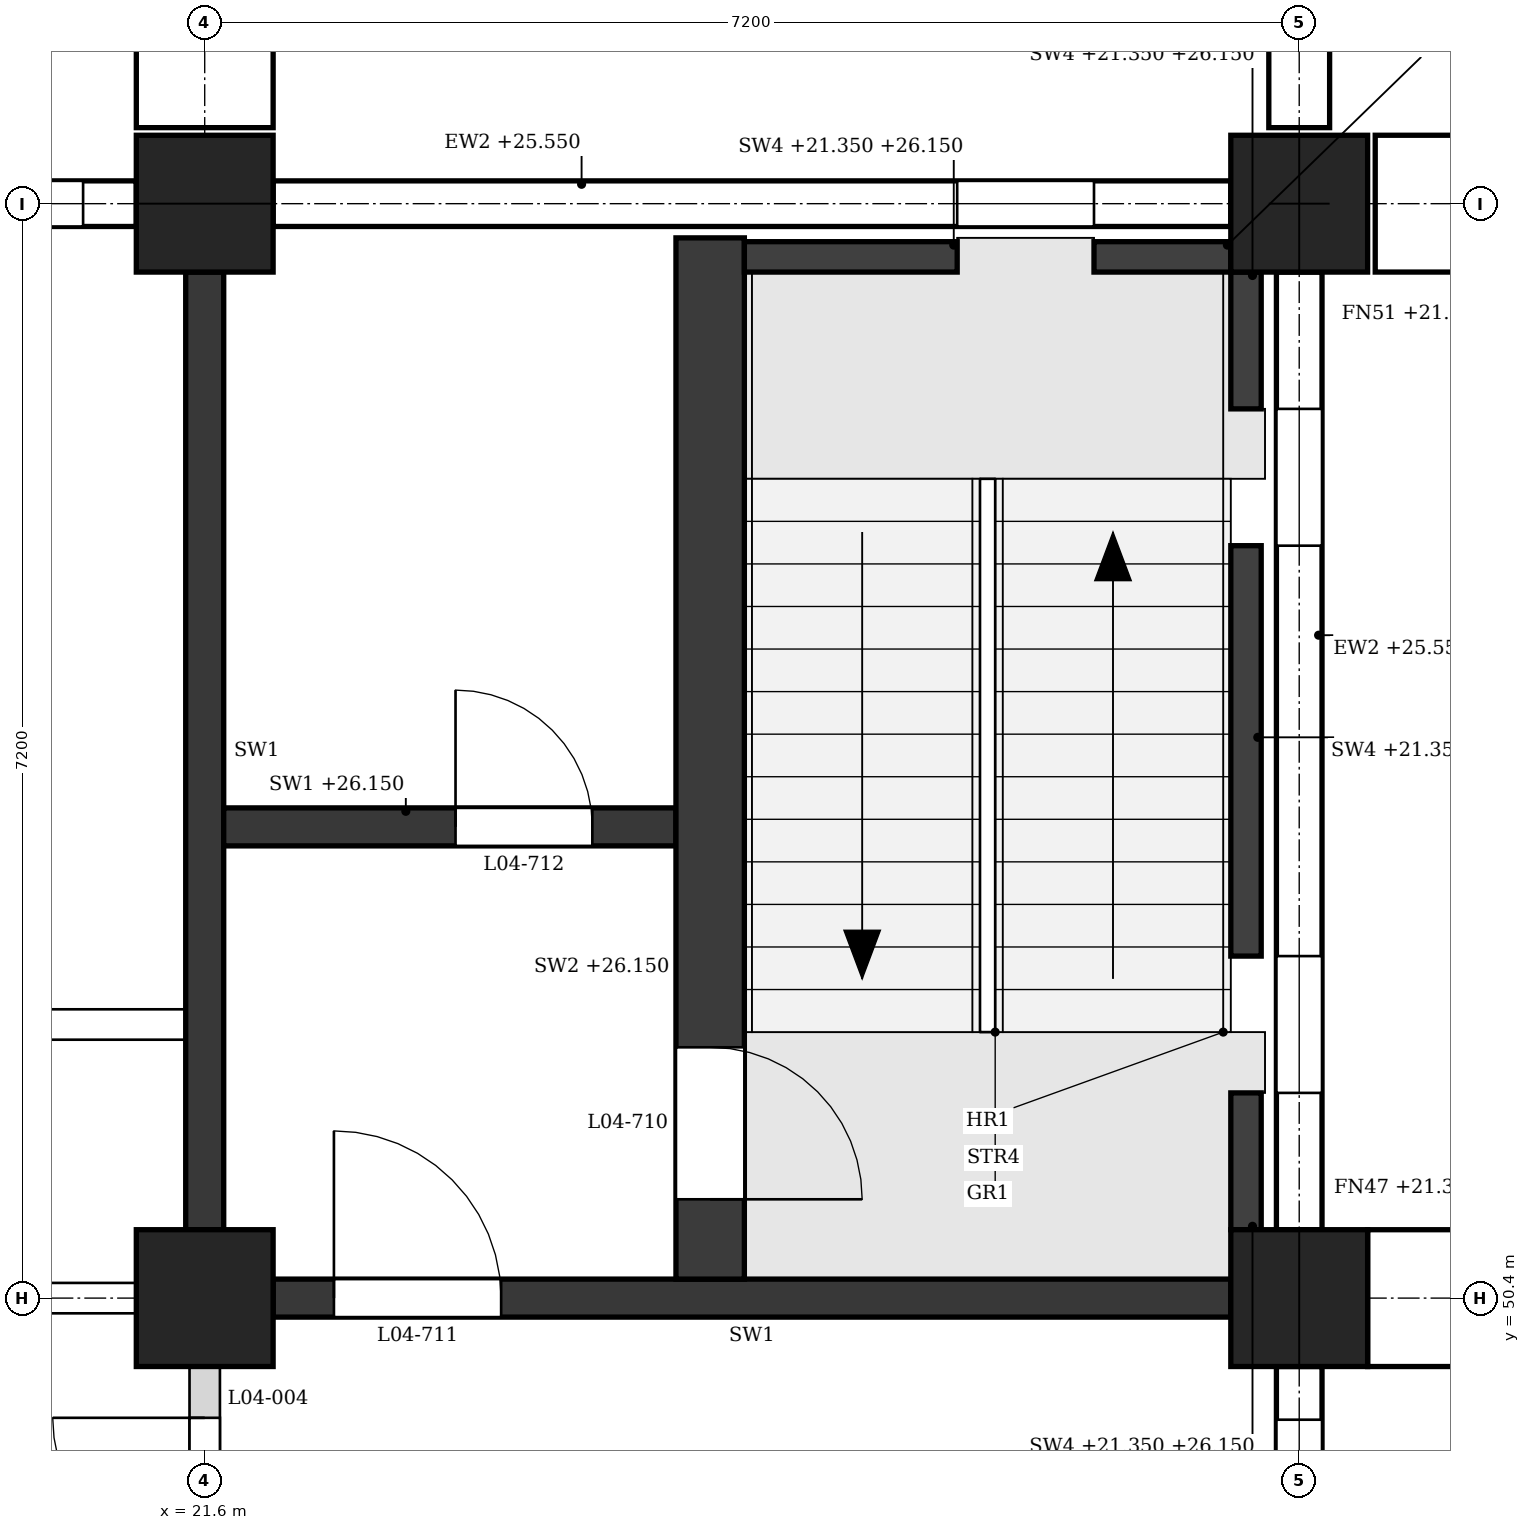
"""IFC4 building model, lengths in metres.
Left out: names, types, materials, properties, quantities, classifications, styles, units other than length and angle.
Written with IfcOpenShell. Run it as: python <this file> out.ifc"""

import sys

from ifc_helpers import new_model, si_unit, direction, frame, frame_2d, origin, origin_2d, place, context, subcontext, project, spatial, polyline, rectangle, outline, extrude, element, fill, save


model = new_model("IFC4")
c1 = context("Model", 3, precision=1e-05, world=origin(), true_north=direction((0.0, 1.0)))
c2 = subcontext(c1, "Body", "Model", "MODEL_VIEW")
j1 = project(units=[si_unit("LENGTHUNIT", "METRE"), si_unit("PLANEANGLEUNIT", "RADIAN")], contexts=[c1])
p1 = place(None, origin())
s1 = spatial("IfcSite", under=j1, at=p1, CompositionType="ELEMENT")
p2 = place(p1, origin())
s2 = spatial("IfcBuilding", under=s1, at=p2, CompositionType="ELEMENT")
p3 = place(p2, frame((0.0, 0.0, 21.6)))
s3 = spatial("IfcBuildingStorey", under=s2, at=p3, CompositionType="ELEMENT", Elevation=21.6)
for number, where, z_axis, x_axis in (
    (1, (21.6, 50.4, 0.0), (0.0, 0.0, 1.0), (1.0, 0.0, 0.0)),
    (2, (21.6, 57.6, 0.0), (0.0, 0.0, 1.0), (1.0, 0.0, 0.0)),
    (3, (28.8, 50.4, 0.0), (0.0, 0.0, 1.0), (1.0, 0.0, 0.0)),
    (4, (28.8, 57.6, 0.0), (0.0, 0.0, 1.0), (1.0, 0.0, 0.0)),
):
    element("IfcColumn", number, at=place(p3, frame(where, z_axis=z_axis, x_axis=x_axis)), inside=s3, PredefinedType="COLUMN", context=c2, shape_type="SweptSolid", body=[
        extrude(rectangle(XDim=0.9, YDim=0.9, at=origin_2d()), origin(), (0.0, 0.0, 1.0), 4.8),
    ])
p4 = place(p3, frame((28.35, 57.6, 0.0), z_axis=(0.0, 0.0, 1.0), x_axis=(-1.0, 0.0, 0.0)))
e5 = element("IfcWall", 5, at=p4, inside=s3, PredefinedType="STANDARD", context=c2, shape_type="SweptSolid", body=[
    extrude(rectangle(XDim=6.3, YDim=0.3, at=frame_2d((3.15, 0.0))), origin(), (0.0, 0.0, 1.0), 3.95),
])
p5 = place(p4, frame((0.9, 0.0, 0.9)))
e6 = element("IfcOpeningElement", 6, at=p5, cuts=e5, PredefinedType="OPENING", context=c2, shape_type="SweptSolid", body=[
    extrude(outline(polyline([(0.0, 0.0), (0.9, 0.0), (0.9, 2.05), (0.45, 2.5), (0.0, 2.05), (0.0, 0.0)])), frame((0.0, 0.16, 0.0), z_axis=(0.0, -1.0, 0.0), x_axis=(1.0, 0.0, 0.0)), (0.0, 0.0, 1.0), 0.32),
])
p6 = place(p3, frame((21.15, 57.6, 0.0), z_axis=(0.0, 0.0, 1.0), x_axis=(-1.0, 0.0, 0.0)))
e7 = element("IfcWall", 7, at=p6, inside=s3, PredefinedType="STANDARD", context=c2, shape_type="SweptSolid", body=[
    extrude(rectangle(XDim=6.3, YDim=0.3, at=frame_2d((3.15, 0.0))), origin(), (0.0, 0.0, 1.0), 3.95),
])
p7 = place(p6, frame((0.35, 0.0, 0.9)))
e8 = element("IfcOpeningElement", 8, at=p7, cuts=e7, PredefinedType="OPENING", context=c2, shape_type="SweptSolid", body=[
    extrude(outline(polyline([(0.0, 0.0), (0.85, 0.0), (0.85, 2.05), (0.425, 2.5), (0.0, 2.05), (0.0, 0.0)])), frame((0.0, 0.16, 0.0), z_axis=(0.0, -1.0, 0.0), x_axis=(1.0, 0.0, 0.0)), (0.0, 0.0, 1.0), 0.32),
])
p8 = place(p6, frame((1.5, 0.0, 0.9)))
e9 = element("IfcOpeningElement", 9, at=p8, cuts=e7, PredefinedType="OPENING", context=c2, shape_type="SweptSolid", body=[
    extrude(outline(polyline([(0.0, 0.0), (0.85, 0.0), (0.85, 2.05), (0.425, 2.5), (0.0, 2.05), (0.0, 0.0)])), frame((0.0, 0.16, 0.0), z_axis=(0.0, -1.0, 0.0), x_axis=(1.0, 0.0, 0.0)), (0.0, 0.0, 1.0), 0.32),
])
p9 = place(p6, frame((3.95, 0.0, 0.9)))
e10 = element("IfcOpeningElement", 10, at=p9, cuts=e7, PredefinedType="OPENING", context=c2, shape_type="SweptSolid", body=[
    extrude(outline(polyline([(0.0, 0.0), (0.85, 0.0), (0.85, 2.05), (0.425, 2.5), (0.0, 2.05), (0.0, 0.0)])), frame((0.0, 0.16, 0.0), z_axis=(0.0, -1.0, 0.0), x_axis=(1.0, 0.0, 0.0)), (0.0, 0.0, 1.0), 0.32),
])
p10 = place(p6, frame((5.1, 0.0, 0.9)))
e11 = element("IfcOpeningElement", 11, at=p10, cuts=e7, PredefinedType="OPENING", context=c2, shape_type="SweptSolid", body=[
    extrude(outline(polyline([(0.0, 0.0), (0.85, 0.0), (0.85, 2.05), (0.425, 2.5), (0.0, 2.05), (0.0, 0.0)])), frame((0.0, 0.16, 0.0), z_axis=(0.0, -1.0, 0.0), x_axis=(1.0, 0.0, 0.0)), (0.0, 0.0, 1.0), 0.32),
])
p11 = place(p3, frame((28.8, 43.65, 0.0), z_axis=(0.0, 0.0, 1.0), x_axis=(0.0, 1.0, 0.0)))
e12 = element("IfcWall", 12, at=p11, inside=s3, PredefinedType="STANDARD", context=c2, shape_type="SweptSolid", body=[
    extrude(rectangle(XDim=6.3, YDim=0.3, at=frame_2d((3.15, 0.0))), origin(), (0.0, 0.0, 1.0), 3.95),
])
p12 = place(p11, frame((3.95, 0.0, 0.9)))
e13 = element("IfcOpeningElement", 13, at=p12, cuts=e12, PredefinedType="OPENING", context=c2, shape_type="SweptSolid", body=[
    extrude(outline(polyline([(0.0, 0.0), (0.85, 0.0), (0.85, 2.05), (0.425, 2.5), (0.0, 2.05), (0.0, 0.0)])), frame((0.0, 0.16, 0.0), z_axis=(0.0, -1.0, 0.0), x_axis=(1.0, 0.0, 0.0)), (0.0, 0.0, 1.0), 0.32),
])
p13 = place(p11, frame((5.1, 0.0, 0.9)))
e14 = element("IfcOpeningElement", 14, at=p13, cuts=e12, PredefinedType="OPENING", context=c2, shape_type="SweptSolid", body=[
    extrude(outline(polyline([(0.0, 0.0), (0.85, 0.0), (0.85, 2.05), (0.425, 2.5), (0.0, 2.05), (0.0, 0.0)])), frame((0.0, 0.16, 0.0), z_axis=(0.0, -1.0, 0.0), x_axis=(1.0, 0.0, 0.0)), (0.0, 0.0, 1.0), 0.32),
])
p14 = place(p3, frame((28.8, 50.85, 0.0), z_axis=(0.0, 0.0, 1.0), x_axis=(0.0, 1.0, 0.0)))
e15 = element("IfcWall", 15, at=p14, inside=s3, PredefinedType="STANDARD", context=c2, shape_type="SweptSolid", body=[
    extrude(rectangle(XDim=6.3, YDim=0.3, at=frame_2d((3.15, 0.0))), origin(), (0.0, 0.0, 1.0), 3.95),
])
p15 = place(p14, frame((0.9, 0.0, 0.9)))
e16 = element("IfcOpeningElement", 16, at=p15, cuts=e15, PredefinedType="OPENING", context=c2, shape_type="SweptSolid", body=[
    extrude(outline(polyline([(0.0, 0.0), (0.9, 0.0), (0.9, 2.05), (0.45, 2.5), (0.0, 2.05), (0.0, 0.0)])), frame((0.0, 0.16, 0.0), z_axis=(0.0, -1.0, 0.0), x_axis=(1.0, 0.0, 0.0)), (0.0, 0.0, 1.0), 0.32),
])
p16 = place(p14, frame((4.5, 0.0, 0.9)))
e17 = element("IfcOpeningElement", 17, at=p16, cuts=e15, PredefinedType="OPENING", context=c2, shape_type="SweptSolid", body=[
    extrude(outline(polyline([(0.0, 0.0), (0.9, 0.0), (0.9, 2.05), (0.45, 2.5), (0.0, 2.05), (0.0, 0.0)])), frame((0.0, 0.16, 0.0), z_axis=(0.0, -1.0, 0.0), x_axis=(1.0, 0.0, 0.0)), (0.0, 0.0, 1.0), 0.32),
])
p17 = place(p3, frame((21.6, 58.1, -0.25), z_axis=(0.0, 0.0, 1.0), x_axis=(0.0, 1.0, 0.0)))
e18 = element("IfcWall", 18, at=p17, inside=s3, PredefinedType="POLYGONAL", context=c2, shape_type="SweptSolid", body=[
    extrude(outline(polyline([(1.3, 0.0), (1.3, 18.9), (1.1, 19.2), (0.0, 19.2), (0.0, 0.0), (1.3, 0.0)])), frame((0.0, 0.45, 0.0), z_axis=(0.0, -1.0, 0.0), x_axis=(1.0, 0.0, 0.0)), (0.0, 0.0, 1.0), 0.9),
])
p18 = place(p3, frame((29.25, 50.4, -0.25), z_axis=(0.0, 0.0, 1.0), x_axis=(1.0, 0.0, 0.0)))
e19 = element("IfcWall", 19, at=p18, inside=s3, PredefinedType="POLYGONAL", context=c2, shape_type="SweptSolid", body=[
    extrude(outline(polyline([(1.1, 0.0), (1.1, 19.2), (0.0, 19.2), (0.0, 0.0), (1.1, 0.0)])), frame((0.0, 0.45, 0.0), z_axis=(0.0, -1.0, 0.0), x_axis=(1.0, 0.0, 0.0)), (0.0, 0.0, 1.0), 0.9),
])
p19 = place(p3, frame((28.8, 58.1, -0.25), z_axis=(0.0, 0.0, 1.0), x_axis=(0.0, 1.0, 0.0)))
e20 = element("IfcWall", 20, at=p19, inside=s3, PredefinedType="POLYGONAL", context=c2, shape_type="SweptSolid", body=[
    extrude(outline(polyline([(0.85, 0.0), (0.85, 18.9), (0.65, 19.2), (0.0, 19.2), (0.0, 0.0), (0.85, 0.0)])), frame((0.0, 0.2, 0.0), z_axis=(0.0, -1.0, 0.0), x_axis=(1.0, 0.0, 0.0)), (0.0, 0.0, 1.0), 0.4),
])
p20 = place(p3, frame((29.3, 57.6, -0.25), z_axis=(0.0, 0.0, 1.0), x_axis=(1.0, 0.0, 0.0)))
e21 = element("IfcWall", 21, at=p20, inside=s3, PredefinedType="POLYGONAL", context=c2, shape_type="SweptSolid", body=[
    extrude(outline(polyline([(1.1, 0.0), (1.1, 19.2), (0.0, 19.2), (0.0, 0.0), (1.1, 0.0)])), frame((0.0, 0.45, 0.0), z_axis=(0.0, -1.0, 0.0), x_axis=(1.0, 0.0, 0.0)), (0.0, 0.0, 1.0), 0.9),
])
p21 = place(p3, frame((22.05, 50.4, 0.0), z_axis=(0.0, 0.0, 1.0), x_axis=(1.0, 0.0, 0.0)))
e22 = element("IfcWall", 22, at=p21, inside=s3, PredefinedType="SHEAR", context=c2, shape_type="SweptSolid", body=[
    extrude(rectangle(XDim=6.3, YDim=0.25, at=frame_2d((3.15, 0.0))), origin(), (0.0, 0.0, 1.0), 3.8),
])
p22 = place(p21, frame((0.4, 0.0, 0.0)))
e23 = element("IfcOpeningElement", 23, at=p22, cuts=e22, PredefinedType="OPENING", context=c2, shape_type="SweptSolid", body=[
    extrude(rectangle(XDim=1.1, YDim=2.1, at=frame_2d((0.55, 1.05))), frame((0.0, 0.135, 0.0), z_axis=(0.0, -1.0, 0.0), x_axis=(1.0, 0.0, 0.0)), (0.0, 0.0, 1.0), 0.27),
])
p23 = place(p3, frame((21.6, 50.85, 0.0), z_axis=(0.0, 0.0, 1.0), x_axis=(0.0, 1.0, 0.0)))
e24 = element("IfcWall", 24, at=p23, inside=s3, PredefinedType="SHEAR", context=c2, shape_type="SweptSolid", body=[
    extrude(rectangle(XDim=6.3, YDim=0.25, at=frame_2d((3.15, 0.0))), origin(), (0.0, 0.0, 1.0), 3.8),
])
p24 = place(p3, frame((28.45, 50.85, -0.25), z_axis=(0.0, 0.0, 1.0), x_axis=(0.0, 1.0, 0.0)))
e25 = element("IfcWall", 25, at=p24, inside=s3, PredefinedType="SHEAR", context=c2, shape_type="SweptSolid", body=[
    extrude(rectangle(XDim=0.9, YDim=0.2, at=frame_2d((0.45, 0.0))), origin(), (0.0, 0.0, 1.0), 4.8),
])
p25 = place(p3, frame((28.45, 52.65, -0.25), z_axis=(0.0, 0.0, 1.0), x_axis=(0.0, 1.0, 0.0)))
e26 = element("IfcWall", 26, at=p25, inside=s3, PredefinedType="SHEAR", context=c2, shape_type="SweptSolid", body=[
    extrude(rectangle(XDim=2.7, YDim=0.2, at=frame_2d((1.35, 0.0))), origin(), (0.0, 0.0, 1.0), 4.8),
])
p26 = place(p3, frame((28.45, 56.25, -0.25), z_axis=(0.0, 0.0, 1.0), x_axis=(0.0, 1.0, 0.0)))
e27 = element("IfcWall", 27, at=p26, inside=s3, PredefinedType="SHEAR", context=c2, shape_type="SweptSolid", body=[
    extrude(rectangle(XDim=0.9, YDim=0.2, at=frame_2d((0.45, 0.0))), origin(), (0.0, 0.0, 1.0), 4.8),
])
p27 = place(p3, frame((25.15, 57.25, -0.25), z_axis=(0.0, 0.0, 1.0), x_axis=(1.0, 0.0, 0.0)))
e28 = element("IfcWall", 28, at=p27, inside=s3, PredefinedType="SHEAR", context=c2, shape_type="SweptSolid", body=[
    extrude(rectangle(XDim=1.4, YDim=0.2, at=frame_2d((0.7, 0.0))), origin(), (0.0, 0.0, 1.0), 4.8),
])
p28 = place(p3, frame((27.45, 57.25, -0.25), z_axis=(0.0, 0.0, 1.0), x_axis=(1.0, 0.0, 0.0)))
e29 = element("IfcWall", 29, at=p28, inside=s3, PredefinedType="SHEAR", context=c2, shape_type="SweptSolid", body=[
    extrude(rectangle(XDim=0.9, YDim=0.2, at=frame_2d((0.45, 0.0))), origin(), (0.0, 0.0, 1.0), 4.8),
])
p29 = place(p3, frame((24.925, 50.525, 0.0), z_axis=(0.0, 0.0, 1.0), x_axis=(0.0, 1.0, 0.0)))
e30 = element("IfcWall", 30, at=p29, inside=s3, PredefinedType="SHEAR", context=c2, shape_type="SweptSolid", body=[
    extrude(rectangle(XDim=6.85, YDim=0.45, at=frame_2d((3.425, 0.0))), origin(), (0.0, 0.0, 1.0), 4.55),
])
p30 = place(p29, frame((0.525, 0.0, 0.0)))
e31 = element("IfcOpeningElement", 31, at=p30, cuts=e30, PredefinedType="OPENING", context=c2, shape_type="SweptSolid", body=[
    extrude(rectangle(XDim=1.0, YDim=2.1, at=frame_2d((0.5, 1.05))), frame((0.0, 0.235, 0.0), z_axis=(0.0, -1.0, 0.0), x_axis=(1.0, 0.0, 0.0)), (0.0, 0.0, 1.0), 0.47),
])
p31 = place(p3, frame((21.725, 53.5, 0.0), z_axis=(0.0, 0.0, 1.0), x_axis=(1.0, 0.0, 0.0)))
e32 = element("IfcWall", 32, at=p31, inside=s3, PredefinedType="SHEAR", context=c2, shape_type="SweptSolid", body=[
    extrude(rectangle(XDim=2.975, YDim=0.25, at=frame_2d((1.487, 0.0))), origin(), (0.0, 0.0, 1.0), 4.55),
])
p32 = place(p31, frame((1.525, 0.0, 0.0)))
e33 = element("IfcOpeningElement", 33, at=p32, cuts=e32, PredefinedType="OPENING", context=c2, shape_type="SweptSolid", body=[
    extrude(rectangle(XDim=0.9, YDim=2.1, at=frame_2d((0.45, 1.05))), frame((0.0, 0.135, 0.0), z_axis=(0.0, -1.0, 0.0), x_axis=(1.0, 0.0, 0.0)), (0.0, 0.0, 1.0), 0.27),
])
p33 = place(p3, frame((14.85, 50.4, 0.0), z_axis=(0.0, 0.0, 1.0), x_axis=(1.0, 0.0, 0.0)))
e34 = element("IfcWall", 34, at=p33, inside=s3, PredefinedType="PARTITIONING", context=c2, shape_type="SweptSolid", body=[
    extrude(rectangle(XDim=6.3, YDim=0.2, at=frame_2d((3.15, 0.0))), origin(), (0.0, 0.0, 1.0), 3.8),
])
p34 = place(p33, frame((4.225, 0.0, 0.0)))
e35 = element("IfcOpeningElement", 35, at=p34, cuts=e34, PredefinedType="OPENING", context=c2, shape_type="SweptSolid", body=[
    extrude(rectangle(XDim=1.0, YDim=2.1, at=frame_2d((0.5, 1.05))), frame((0.0, 0.11, 0.0), z_axis=(0.0, -1.0, 0.0), x_axis=(1.0, 0.0, 0.0)), (0.0, 0.0, 1.0), 0.22),
])
p35 = place(p3, frame((7.325, 52.2, 0.0), z_axis=(0.0, 0.0, 1.0), x_axis=(1.0, 0.0, 0.0)))
e36 = element("IfcWall", 36, at=p35, inside=s3, PredefinedType="PARTITIONING", context=c2, shape_type="SweptSolid", body=[
    extrude(outline(polyline([(0.0, 0.0), (14.15, 0.0), (14.15, 3.8), (14.025, 3.8), (14.025, 4.55), (7.325, 4.55), (7.325, 3.8), (6.825, 3.8), (6.825, 4.55), (0.125, 4.55), (0.125, 3.8), (0.0, 3.8), (0.0, 0.0)])), frame((0.0, 0.1, 0.0), z_axis=(0.0, -1.0, 0.0), x_axis=(1.0, 0.0, 0.0)), (0.0, 0.0, 1.0), 0.2),
])
p36 = place(p35, frame((1.238, 0.0, 0.0)))
e37 = element("IfcOpeningElement", 37, at=p36, cuts=e36, PredefinedType="OPENING", context=c2, shape_type="SweptSolid", body=[
    extrude(rectangle(XDim=1.0, YDim=2.1, at=frame_2d((0.5, 1.05))), frame((0.0, 0.11, 0.0), z_axis=(0.0, -1.0, 0.0), x_axis=(1.0, 0.0, 0.0)), (0.0, 0.0, 1.0), 0.22),
])
p37 = place(p35, frame((4.775, 0.0, 0.0)))
e38 = element("IfcOpeningElement", 38, at=p37, cuts=e36, PredefinedType="OPENING", context=c2, shape_type="SweptSolid", body=[
    extrude(rectangle(XDim=1.0, YDim=2.1, at=frame_2d((0.5, 1.05))), frame((0.0, 0.11, 0.0), z_axis=(0.0, -1.0, 0.0), x_axis=(1.0, 0.0, 0.0)), (0.0, 0.0, 1.0), 0.22),
])
p38 = place(p35, frame((8.375, 0.0, 0.0)))
e39 = element("IfcOpeningElement", 39, at=p38, cuts=e36, PredefinedType="OPENING", context=c2, shape_type="SweptSolid", body=[
    extrude(rectangle(XDim=1.0, YDim=2.1, at=frame_2d((0.5, 1.05))), frame((0.0, 0.11, 0.0), z_axis=(0.0, -1.0, 0.0), x_axis=(1.0, 0.0, 0.0)), (0.0, 0.0, 1.0), 0.22),
])
p39 = place(p35, frame((11.913, 0.0, 0.0)))
e40 = element("IfcOpeningElement", 40, at=p39, cuts=e36, PredefinedType="OPENING", context=c2, shape_type="SweptSolid", body=[
    extrude(rectangle(XDim=1.0, YDim=2.1, at=frame_2d((0.5, 1.05))), frame((0.0, 0.11, 0.0), z_axis=(0.0, -1.0, 0.0), x_axis=(1.0, 0.0, 0.0)), (0.0, 0.0, 1.0), 0.22),
])
p40 = place(p3, frame((21.6, 47.275, 0.0), z_axis=(0.0, 0.0, 1.0), x_axis=(0.0, 1.0, 0.0)))
e41 = element("IfcWall", 41, at=p40, inside=s3, PredefinedType="PARTITIONING", context=c2, shape_type="SweptSolid", body=[
    extrude(rectangle(XDim=2.675, YDim=0.2, at=frame_2d((1.337, 0.0))), origin(), (0.0, 0.0, 1.0), 3.8),
])
p41 = place(p40, frame((0.337, 0.0, 0.0)))
e42 = element("IfcOpeningElement", 42, at=p41, cuts=e41, PredefinedType="OPENING", context=c2, shape_type="SweptSolid", body=[
    extrude(rectangle(XDim=2.0, YDim=2.4, at=frame_2d((1.0, 1.2))), frame((0.0, 0.11, 0.0), z_axis=(0.0, -1.0, 0.0), x_axis=(1.0, 0.0, 0.0)), (0.0, 0.0, 1.0), 0.22),
])
p42 = place(p13, origin())
e43 = element("IfcWindow", 43, at=p42, inside=s3, PartitioningType="SINGLE_PANEL", PredefinedType="WINDOW", context=c2, shape_type="SweptSolid", body=[
    extrude(outline(polyline([(0.0, 0.0), (0.85, 0.0), (0.85, 2.05), (0.425, 2.5), (0.0, 2.05), (0.0, 0.0)])), frame((0.0, 0.03, 0.0), z_axis=(0.0, -1.0, 0.0), x_axis=(1.0, 0.0, 0.0)), (0.0, 0.0, 1.0), 0.06),
])
fill(e14, e43)
p43 = place(p15, origin())
e44 = element("IfcWindow", 44, at=p43, inside=s3, PartitioningType="SINGLE_PANEL", PredefinedType="WINDOW", context=c2, shape_type="SweptSolid", body=[
    extrude(outline(polyline([(0.0, 0.0), (0.9, 0.0), (0.9, 2.05), (0.45, 2.5), (0.0, 2.05), (0.0, 0.0)])), frame((0.0, 0.03, 0.0), z_axis=(0.0, -1.0, 0.0), x_axis=(1.0, 0.0, 0.0)), (0.0, 0.0, 1.0), 0.06),
])
fill(e16, e44)
p44 = place(p16, origin())
e45 = element("IfcWindow", 45, at=p44, inside=s3, PartitioningType="SINGLE_PANEL", PredefinedType="WINDOW", context=c2, shape_type="SweptSolid", body=[
    extrude(outline(polyline([(0.0, 0.0), (0.9, 0.0), (0.9, 2.05), (0.45, 2.5), (0.0, 2.05), (0.0, 0.0)])), frame((0.0, 0.03, 0.0), z_axis=(0.0, -1.0, 0.0), x_axis=(1.0, 0.0, 0.0)), (0.0, 0.0, 1.0), 0.06),
])
fill(e17, e45)
p45 = place(p5, origin())
e46 = element("IfcWindow", 46, at=p45, inside=s3, PartitioningType="SINGLE_PANEL", PredefinedType="WINDOW", context=c2, shape_type="SweptSolid", body=[
    extrude(outline(polyline([(0.0, 0.0), (0.9, 0.0), (0.9, 2.05), (0.45, 2.5), (0.0, 2.05), (0.0, 0.0)])), frame((0.0, 0.03, 0.0), z_axis=(0.0, -1.0, 0.0), x_axis=(1.0, 0.0, 0.0)), (0.0, 0.0, 1.0), 0.06),
])
fill(e6, e46)
p46 = place(p7, origin())
e47 = element("IfcWindow", 47, at=p46, inside=s3, PartitioningType="SINGLE_PANEL", PredefinedType="WINDOW", context=c2, shape_type="SweptSolid", body=[
    extrude(outline(polyline([(0.0, 0.0), (0.85, 0.0), (0.85, 2.05), (0.425, 2.5), (0.0, 2.05), (0.0, 0.0)])), frame((0.0, 0.03, 0.0), z_axis=(0.0, -1.0, 0.0), x_axis=(1.0, 0.0, 0.0)), (0.0, 0.0, 1.0), 0.06),
])
fill(e8, e47)
p47 = place(p30, frame((1.0, 0.0, 0.0), z_axis=(0.0, 0.0, 1.0), x_axis=(-1.0, 0.0, 0.0)))
e48 = element("IfcDoor", 48, at=p47, inside=s3, OperationType="SINGLE_SWING_RIGHT", PredefinedType="DOOR", context=c2, shape_type="SweptSolid", body=[
    extrude(rectangle(XDim=1.0, YDim=2.1, at=frame_2d((0.5, 1.05))), frame((0.0, 0.025, 0.0), z_axis=(0.0, -1.0, 0.0), x_axis=(1.0, 0.0, 0.0)), (0.0, 0.0, 1.0), 0.05),
])
fill(e31, e48)
p48 = place(p22, origin())
e49 = element("IfcDoor", 49, at=p48, inside=s3, OperationType="SINGLE_SWING_LEFT", PredefinedType="DOOR", context=c2, shape_type="SweptSolid", body=[
    extrude(rectangle(XDim=1.1, YDim=2.1, at=frame_2d((0.55, 1.05))), frame((0.0, 0.025, 0.0), z_axis=(0.0, -1.0, 0.0), x_axis=(1.0, 0.0, 0.0)), (0.0, 0.0, 1.0), 0.05),
])
fill(e23, e49)
p49 = place(p32, origin())
e50 = element("IfcDoor", 50, at=p49, inside=s3, OperationType="SINGLE_SWING_LEFT", PredefinedType="DOOR", context=c2, shape_type="SweptSolid", body=[
    extrude(rectangle(XDim=0.9, YDim=2.1, at=frame_2d((0.45, 1.05))), frame((0.0, 0.025, 0.0), z_axis=(0.0, -1.0, 0.0), x_axis=(1.0, 0.0, 0.0)), (0.0, 0.0, 1.0), 0.05),
])
fill(e33, e50)
p50 = place(p41, origin())
e51 = element("IfcDoor", 51, at=p50, inside=s3, OperationType="DOUBLE_DOOR_SINGLE_SWING", PredefinedType="DOOR", context=c2, shape_type="SweptSolid", body=[
    extrude(rectangle(XDim=2.0, YDim=2.4, at=frame_2d((1.0, 1.2))), frame((0.0, 0.025, 0.0), z_axis=(0.0, -1.0, 0.0), x_axis=(1.0, 0.0, 0.0)), (0.0, 0.0, 1.0), 0.05),
])
fill(e42, e51)
save(model, sys.argv[1])
